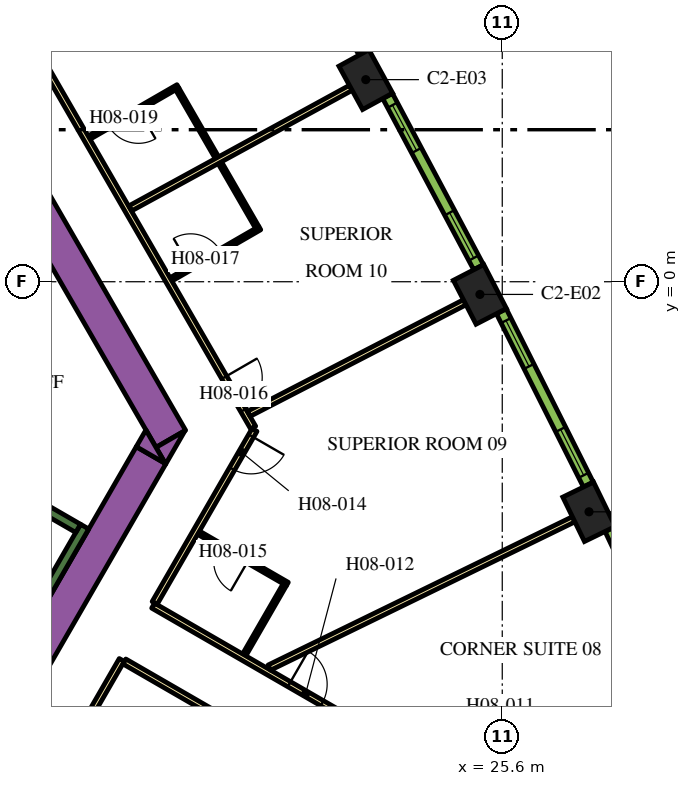
"""IFC4 building model, lengths in metres.
Left out: names, types, materials, properties, quantities, classifications, styles, units other than length and angle.
Written with IfcOpenShell. Run it as: python <this file> out.ifc"""

import sys

from ifc_helpers import new_model, si_unit, direction, frame, frame_2d, origin, origin_2d, place, context, subcontext, project, spatial, polyline, rectangle, outline, extrude, element, fill, save


model = new_model("IFC4")
c1 = context("Model", 3, precision=1e-05, world=origin(), true_north=direction((0.0, 1.0)))
c2 = subcontext(c1, "Body", "Model", "MODEL_VIEW")
j1 = project(units=[si_unit("LENGTHUNIT", "METRE"), si_unit("PLANEANGLEUNIT", "RADIAN")], contexts=[c1])
p1 = place(None, origin())
s1 = spatial("IfcSite", under=j1, at=p1, CompositionType="ELEMENT")
p2 = place(p1, origin())
s2 = spatial("IfcBuilding", under=s1, at=p2, CompositionType="ELEMENT")
p3 = place(p2, frame((0.0, 0.0, 107.1)))
s3 = spatial("IfcBuildingStorey", under=s2, at=p3, CompositionType="ELEMENT", Elevation=107.1)
for number, where, z_axis, x_axis in (
    (1, (27.883, -6.054, 0.0), (0.0, 0.0, 1.0), (-0.438, 0.899, 0.0)),
    (2, (25.012, -0.334, 0.0), (0.0, 0.0, 1.0), (-0.459, 0.888, 0.0)),
    (3, (22.009, 5.317, 0.0), (0.0, 0.0, 1.0), (-0.48, 0.877, 0.0)),
):
    element("IfcColumn", number, at=place(p3, frame(where, z_axis=z_axis, x_axis=x_axis)), inside=s3, PredefinedType="COLUMN", context=c2, shape_type="SweptSolid", body=[
        extrude(rectangle(XDim=1.3, YDim=0.9, at=origin_2d()), origin(), (0.0, 0.0, 1.0), 3.9),
    ])
p4 = place(p3, frame((6.711, 13.476, 0.0), z_axis=(0.0, 0.0, 1.0), x_axis=(0.500002723396, -0.866023831425, 0.0)))
e4 = element("IfcWall", 4, at=p4, inside=s3, PredefinedType="SOLIDWALL", context=c2, shape_type="SweptSolid", body=[
    extrude(rectangle(XDim=20.334, YDim=0.9, at=frame_2d((10.167, 0.0))), origin(), (0.0, 0.0, 1.0), 3.9),
])
p5 = place(p3, origin())
e5 = element("IfcWall", 5, at=p5, inside=s3, PredefinedType="SOLIDWALL", context=c2, shape_type="SweptSolid", body=[
    extrude(outline(polyline([(16.743, -4.8), (16.489, -4.36), (17.251, -3.92), (16.743, -4.8)])), origin(), (0.0, 0.0, 1.0), 3.9),
])
p6 = place(p3, frame((11.695, -12.644, 0.0), z_axis=(0.0, 0.0, 1.0), x_axis=(0.500010229568, 0.86601949766, 0.0)))
e6 = element("IfcWall", 6, at=p6, inside=s3, PredefinedType="SOLIDWALL", context=c2, shape_type="SweptSolid", body=[
    extrude(rectangle(XDim=9.326, YDim=0.9, at=frame_2d((4.663, 0.0))), origin(), (0.0, 0.0, 1.0), 3.9),
])
e7 = element("IfcWall", 7, at=p5, inside=s3, PredefinedType="SOLIDWALL", context=c2, shape_type="SweptSolid", body=[
    extrude(outline(polyline([(16.223, -3.9), (16.732, -4.78), (15.969, -4.34), (16.223, -3.9)])), origin(), (0.0, 0.0, 1.0), 3.9),
])
p7 = place(p3, frame((12.885, -9.431, 0.0), z_axis=(0.0, 0.0, 1.0), x_axis=(0.500020560727, 0.866013532718, 0.0)))
e8 = element("IfcWall", 8, at=p7, inside=s3, PredefinedType="SOLIDWALL", context=c2, shape_type="SweptSolid", body=[
    extrude(rectangle(XDim=3.45, YDim=0.25, at=frame_2d((1.725, 0.0))), origin(), (0.0, 0.0, 1.0), 3.9),
])
p8 = place(p3, frame((8.334, -2.964, 0.0), z_axis=(0.0, 0.0, 1.0), x_axis=(0.866016039709, -0.500016218704, 0.0)))
e9 = element("IfcWall", 9, at=p8, inside=s3, PredefinedType="SOLIDWALL", context=c2, shape_type="SweptSolid", body=[
    extrude(rectangle(XDim=7.05, YDim=0.25, at=frame_2d((3.525, 0.0))), origin(), (0.0, 0.0, 1.0), 3.9),
])
p9 = place(p3, frame((16.412, -8.523, 0.0), z_axis=(0.0, 0.0, 1.0), x_axis=(0.866025629663, -0.499999608766, 0.0)))
e10 = element("IfcWall", 10, at=p9, inside=s3, PredefinedType="PARTITIONING", context=c2, shape_type="SweptSolid", body=[
    extrude(rectangle(XDim=13.624, YDim=0.15, at=frame_2d((6.812, 0.0))), origin(), (0.0, 0.0, 1.0), 2.75),
])
p10 = place(p9, frame((4.134, 0.0, 0.0)))
e11 = element("IfcOpeningElement", 11, at=p10, cuts=e10, PredefinedType="OPENING", context=c2, shape_type="SweptSolid", body=[
    extrude(rectangle(XDim=1.0, YDim=2.1, at=frame_2d((0.5, 1.05))), frame((0.0, 0.085, 0.0), z_axis=(0.0, -1.0, 0.0), x_axis=(1.0, 0.0, 0.0)), (0.0, 0.0, 1.0), 0.17),
])
p11 = place(p3, frame((19.081, -3.9, 0.0), z_axis=(0.0, 0.0, 1.0), x_axis=(-0.499974327079, -0.866040225545, 0.0)))
e12 = element("IfcWall", 12, at=p11, inside=s3, PredefinedType="PARTITIONING", context=c2, shape_type="SweptSolid", body=[
    extrude(rectangle(XDim=5.258, YDim=0.15, at=frame_2d((2.629, 0.0))), origin(), (0.0, 0.0, 1.0), 2.75),
])
p12 = place(p11, frame((0.18, 0.0, 0.0)))
e13 = element("IfcOpeningElement", 13, at=p12, cuts=e12, PredefinedType="OPENING", context=c2, shape_type="SweptSolid", body=[
    extrude(rectangle(XDim=1.0, YDim=2.1, at=frame_2d((0.5, 1.05))), frame((0.0, 0.085, 0.0), z_axis=(0.0, -1.0, 0.0), x_axis=(1.0, 0.0, 0.0)), (0.0, 0.0, 1.0), 0.17),
])
p13 = place(p3, frame((6.163, 18.475, 0.0), z_axis=(0.0, 0.0, 1.0), x_axis=(0.500001317485, -0.866024643133, 0.0)))
e14 = element("IfcWall", 14, at=p13, inside=s3, PredefinedType="PARTITIONING", context=c2, shape_type="SweptSolid", body=[
    extrude(rectangle(XDim=25.767, YDim=0.15, at=frame_2d((12.883, 0.0))), origin(), (0.0, 0.0, 1.0), 2.75),
])
p14 = place(p13, frame((24.241, 0.0, 0.0)))
e15 = element("IfcOpeningElement", 15, at=p14, cuts=e14, PredefinedType="OPENING", context=c2, shape_type="SweptSolid", body=[
    extrude(rectangle(XDim=1.0, YDim=2.1, at=frame_2d((0.5, 1.05))), frame((0.0, 0.085, 0.0), z_axis=(0.0, -1.0, 0.0), x_axis=(1.0, 0.0, 0.0)), (0.0, 0.0, 1.0), 0.17),
])
p15 = place(p13, frame((13.144, 0.0, 0.0)))
e16 = element("IfcOpeningElement", 16, at=p15, cuts=e14, PredefinedType="OPENING", context=c2, shape_type="SweptSolid", body=[
    extrude(rectangle(XDim=1.0, YDim=2.1, at=frame_2d((0.5, 1.05))), frame((0.0, 0.085, 0.0), z_axis=(0.0, -1.0, 0.0), x_axis=(1.0, 0.0, 0.0)), (0.0, 0.0, 1.0), 0.17),
])
p16 = place(p13, frame((10.874, 0.0, 0.0)))
e17 = element("IfcOpeningElement", 17, at=p16, cuts=e14, PredefinedType="OPENING", context=c2, shape_type="SweptSolid", body=[
    extrude(rectangle(XDim=0.9, YDim=2.1, at=frame_2d((0.45, 1.05))), frame((0.0, 0.085, 0.0), z_axis=(0.0, -1.0, 0.0), x_axis=(1.0, 0.0, 0.0)), (0.0, 0.0, 1.0), 0.17),
])
p17 = place(p13, frame((3.718, 0.0, 0.0)))
e18 = element("IfcOpeningElement", 18, at=p17, cuts=e14, PredefinedType="OPENING", context=c2, shape_type="SweptSolid", body=[
    extrude(rectangle(XDim=1.0, YDim=2.1, at=frame_2d((0.5, 1.05))), frame((0.0, 0.085, 0.0), z_axis=(0.0, -1.0, 0.0), x_axis=(1.0, 0.0, 0.0)), (0.0, 0.0, 1.0), 0.17),
])
p18 = place(p13, frame((2.411, 0.0, 0.0)))
e19 = element("IfcOpeningElement", 19, at=p18, cuts=e14, PredefinedType="OPENING", context=c2, shape_type="SweptSolid", body=[
    extrude(rectangle(XDim=1.0, YDim=2.1, at=frame_2d((0.5, 1.05))), frame((0.0, 0.085, 0.0), z_axis=(0.0, -1.0, 0.0), x_axis=(1.0, 0.0, 0.0)), (0.0, 0.0, 1.0), 0.17),
])
p19 = place(p3, frame((15.587, -9.952, 0.0), z_axis=(0.0, 0.0, 1.0), x_axis=(-0.500016618951, -0.866015808616, 0.0)))
e20 = element("IfcWall", 20, at=p19, inside=s3, PredefinedType="PARTITIONING", context=c2, shape_type="SweptSolid", body=[
    extrude(rectangle(XDim=5.268, YDim=0.15, at=frame_2d((2.634, 0.0))), origin(), (0.0, 0.0, 1.0), 2.75),
])
p20 = place(p3, frame((27.386, -16.764, 0.0), z_axis=(0.0, 0.0, 1.0), x_axis=(-0.866022585856, 0.500004880763, 0.0)))
e21 = element("IfcWall", 21, at=p20, inside=s3, PredefinedType="PARTITIONING", context=c2, shape_type="SweptSolid", body=[
    extrude(rectangle(XDim=13.544, YDim=0.15, at=frame_2d((6.772, 0.0))), origin(), (0.0, 0.0, 1.0), 2.75),
])
p21 = place(p20, frame((9.447, 0.0, 0.0)))
e22 = element("IfcOpeningElement", 22, at=p21, cuts=e21, PredefinedType="OPENING", context=c2, shape_type="SweptSolid", body=[
    extrude(rectangle(XDim=1.0, YDim=2.1, at=frame_2d((0.5, 1.05))), frame((0.0, 0.085, 0.0), z_axis=(0.0, -1.0, 0.0), x_axis=(1.0, 0.0, 0.0)), (0.0, 0.0, 1.0), 0.17),
])
p22 = place(p20, frame((3.926, 0.0, 0.0)))
e23 = element("IfcOpeningElement", 23, at=p22, cuts=e21, PredefinedType="OPENING", context=c2, shape_type="SweptSolid", body=[
    extrude(rectangle(XDim=0.9, YDim=2.1, at=frame_2d((0.45, 1.05))), frame((0.0, 0.085, 0.0), z_axis=(0.0, -1.0, 0.0), x_axis=(1.0, 0.0, 0.0)), (0.0, 0.0, 1.0), 0.17),
])
p23 = place(p3, frame((21.614, 5.102, 0.0), z_axis=(0.0, 0.0, 1.0), x_axis=(-0.877484555087, -0.479604895287, 0.0)))
e24 = element("IfcWall", 24, at=p23, inside=s3, PredefinedType="PARTITIONING", context=c2, shape_type="SweptSolid", body=[
    extrude(rectangle(XDim=6.611, YDim=0.15, at=frame_2d((3.306, 0.0))), origin(), (0.0, 0.0, 1.0), 2.75),
])
p24 = place(p3, frame((24.613, -0.541, 0.0), z_axis=(0.0, 0.0, 1.0), x_axis=(-0.888459912519, -0.458954228487, 0.0)))
e25 = element("IfcWall", 25, at=p24, inside=s3, PredefinedType="PARTITIONING", context=c2, shape_type="SweptSolid", body=[
    extrude(rectangle(XDim=6.392, YDim=0.15, at=frame_2d((3.196, 0.0))), origin(), (0.0, 0.0, 1.0), 2.75),
])
p25 = place(p3, frame((27.478, -6.251, 0.0), z_axis=(0.0, 0.0, 1.0), x_axis=(-0.898940618603, -0.438070501432, 0.0)))
e26 = element("IfcWall", 26, at=p25, inside=s3, PredefinedType="PARTITIONING", context=c2, shape_type="SweptSolid", body=[
    extrude(rectangle(XDim=8.909, YDim=0.15, at=frame_2d((4.455, 0.0))), origin(), (0.0, 0.0, 1.0), 2.75),
])
p26 = place(p3, frame((19.946, -7.953, 0.0), z_axis=(0.0, 0.0, 1.0), x_axis=(-0.86599734893, 0.500048589285, 0.0)))
e27 = element("IfcWall", 27, at=p26, inside=s3, PredefinedType="PARTITIONING", context=c2, shape_type="SweptSolid", body=[
    extrude(rectangle(XDim=2.7, YDim=0.1, at=frame_2d((1.35, 0.0))), origin(), (0.0, 0.0, 1.0), 2.75),
])
p27 = place(p26, frame((1.2, 0.0, 0.0)))
e28 = element("IfcOpeningElement", 28, at=p27, cuts=e27, PredefinedType="OPENING", context=c2, shape_type="SweptSolid", body=[
    extrude(rectangle(XDim=0.9, YDim=2.1, at=frame_2d((0.45, 1.05))), frame((0.0, 0.06, 0.0), z_axis=(0.0, -1.0, 0.0), x_axis=(1.0, 0.0, 0.0)), (0.0, 0.0, 1.0), 0.12),
])
p28 = place(p3, frame((19.877, -7.972, 0.0), z_axis=(0.0, 0.0, 1.0), x_axis=(-0.500010206181, -0.866019511163, 0.0)))
e29 = element("IfcWall", 29, at=p28, inside=s3, PredefinedType="PARTITIONING", context=c2, shape_type="SweptSolid", body=[
    extrude(rectangle(XDim=2.13, YDim=0.1, at=frame_2d((1.065, 0.0))), origin(), (0.0, 0.0, 1.0), 2.75),
])
p29 = place(p3, frame((16.881, 0.061, 0.0), z_axis=(0.0, 0.0, 1.0), x_axis=(0.866019956843, 0.50000943426, 0.0)))
e30 = element("IfcWall", 30, at=p29, inside=s3, PredefinedType="PARTITIONING", context=c2, shape_type="SweptSolid", body=[
    extrude(rectangle(XDim=2.7, YDim=0.1, at=frame_2d((1.35, 0.0))), origin(), (0.0, 0.0, 1.0), 2.75),
])
p30 = place(p29, frame((0.6, 0.0, 0.0)))
e31 = element("IfcOpeningElement", 31, at=p30, cuts=e30, PredefinedType="OPENING", context=c2, shape_type="SweptSolid", body=[
    extrude(rectangle(XDim=0.9, YDim=2.1, at=frame_2d((0.45, 1.05))), frame((0.0, 0.06, 0.0), z_axis=(0.0, -1.0, 0.0), x_axis=(1.0, 0.0, 0.0)), (0.0, 0.0, 1.0), 0.12),
])
p31 = place(p3, frame((19.151, 1.429, 0.0), z_axis=(0.0, 0.0, 1.0), x_axis=(-0.500024377727, 0.866011328839, 0.0)))
e32 = element("IfcWall", 32, at=p31, inside=s3, PredefinedType="PARTITIONING", context=c2, shape_type="SweptSolid", body=[
    extrude(rectangle(XDim=1.96, YDim=0.1, at=frame_2d((0.98, 0.0))), origin(), (0.0, 0.0, 1.0), 2.75),
])
p32 = place(p3, frame((17.066, 5.141, 0.0), z_axis=(0.0, 0.0, 1.0), x_axis=(-0.866059108428, -0.4999416173, 0.0)))
e33 = element("IfcWall", 33, at=p32, inside=s3, PredefinedType="PARTITIONING", context=c2, shape_type="SweptSolid", body=[
    extrude(rectangle(XDim=2.7, YDim=0.1, at=frame_2d((1.35, 0.0))), origin(), (0.0, 0.0, 1.0), 2.75),
])
p33 = place(p32, frame((1.2, 0.0, 0.0)))
e34 = element("IfcOpeningElement", 34, at=p33, cuts=e33, PredefinedType="OPENING", context=c2, shape_type="SweptSolid", body=[
    extrude(rectangle(XDim=0.9, YDim=2.1, at=frame_2d((0.45, 1.05))), frame((0.0, 0.06, 0.0), z_axis=(0.0, -1.0, 0.0), x_axis=(1.0, 0.0, 0.0)), (0.0, 0.0, 1.0), 0.12),
])
p34 = place(p3, frame((17.047, 5.073, 0.0), z_axis=(0.0, 0.0, 1.0), x_axis=(0.500008976872, -0.866020220923, 0.0)))
e35 = element("IfcWall", 35, at=p34, inside=s3, PredefinedType="PARTITIONING", context=c2, shape_type="SweptSolid", body=[
    extrude(rectangle(XDim=2.09, YDim=0.1, at=frame_2d((1.045, 0.0))), origin(), (0.0, 0.0, 1.0), 2.75),
])
p35 = place(p3, frame((30.62, -11.127, 0.0), z_axis=(0.0, 0.0, 1.0), x_axis=(-0.427543726596, 0.903994669148, 0.0)))
e36 = element("IfcWall", 36, at=p35, inside=s3, PredefinedType="SOLIDWALL", context=c2, shape_type="SweptSolid", body=[
    extrude(rectangle(XDim=5.107, YDim=0.29, at=frame_2d((2.553, 0.0))), origin(), (0.0, 0.0, 1.0), 3.65),
])
p36 = place(p35, frame((0.24, 0.0, 0.9)))
e37 = element("IfcOpeningElement", 37, at=p36, cuts=e36, PredefinedType="OPENING", context=c2, shape_type="SweptSolid", body=[
    extrude(rectangle(XDim=1.35, YDim=2.15, at=frame_2d((0.675, 1.075))), frame((0.0, 0.155, 0.0), z_axis=(0.0, -1.0, 0.0), x_axis=(1.0, 0.0, 0.0)), (0.0, 0.0, 1.0), 0.31),
])
p37 = place(p35, frame((3.471, 0.0, 0.9)))
e38 = element("IfcOpeningElement", 38, at=p37, cuts=e36, PredefinedType="OPENING", context=c2, shape_type="SweptSolid", body=[
    extrude(rectangle(XDim=1.35, YDim=2.15, at=frame_2d((0.675, 1.075))), frame((0.0, 0.155, 0.0), z_axis=(0.0, -1.0, 0.0), x_axis=(1.0, 0.0, 0.0)), (0.0, 0.0, 1.0), 0.31),
])
p38 = place(p3, frame((27.864, -5.336, 0.0), z_axis=(0.0, 0.0, 1.0), x_axis=(-0.448534297211, 0.893765620409, 0.0)))
e39 = element("IfcWall", 39, at=p38, inside=s3, PredefinedType="SOLIDWALL", context=c2, shape_type="SweptSolid", body=[
    extrude(rectangle(XDim=5.1, YDim=0.29, at=frame_2d((2.55, 0.0))), origin(), (0.0, 0.0, 1.0), 3.65),
])
p39 = place(p38, frame((0.272, 0.0, 0.9)))
e40 = element("IfcOpeningElement", 40, at=p39, cuts=e39, PredefinedType="OPENING", context=c2, shape_type="SweptSolid", body=[
    extrude(rectangle(XDim=1.35, YDim=2.15, at=frame_2d((0.675, 1.075))), frame((0.0, 0.155, 0.0), z_axis=(0.0, -1.0, 0.0), x_axis=(1.0, 0.0, 0.0)), (0.0, 0.0, 1.0), 0.31),
])
p40 = place(p38, frame((3.478, 0.0, 0.9)))
e41 = element("IfcOpeningElement", 41, at=p40, cuts=e39, PredefinedType="OPENING", context=c2, shape_type="SweptSolid", body=[
    extrude(rectangle(XDim=1.35, YDim=2.15, at=frame_2d((0.675, 1.075))), frame((0.0, 0.155, 0.0), z_axis=(0.0, -1.0, 0.0), x_axis=(1.0, 0.0, 0.0)), (0.0, 0.0, 1.0), 0.31),
])
p41 = place(p3, frame((24.977, 0.383, 0.0), z_axis=(0.0, 0.0, 1.0), x_axis=(-0.469323203119, 0.883026461106, 0.0)))
e42 = element("IfcWall", 42, at=p41, inside=s3, PredefinedType="SOLIDWALL", context=c2, shape_type="SweptSolid", body=[
    extrude(rectangle(XDim=5.101, YDim=0.29, at=frame_2d((2.55, 0.0))), origin(), (0.0, 0.0, 1.0), 3.65),
])
p42 = place(p41, frame((0.273, 0.0, 0.9)))
e43 = element("IfcOpeningElement", 43, at=p42, cuts=e42, PredefinedType="OPENING", context=c2, shape_type="SweptSolid", body=[
    extrude(rectangle(XDim=1.35, YDim=2.15, at=frame_2d((0.675, 1.075))), frame((0.0, 0.155, 0.0), z_axis=(0.0, -1.0, 0.0), x_axis=(1.0, 0.0, 0.0)), (0.0, 0.0, 1.0), 0.31),
])
p43 = place(p41, frame((3.478, 0.0, 0.9)))
e44 = element("IfcOpeningElement", 44, at=p43, cuts=e42, PredefinedType="OPENING", context=c2, shape_type="SweptSolid", body=[
    extrude(rectangle(XDim=1.35, YDim=2.15, at=frame_2d((0.675, 1.075))), frame((0.0, 0.155, 0.0), z_axis=(0.0, -1.0, 0.0), x_axis=(1.0, 0.0, 0.0)), (0.0, 0.0, 1.0), 0.31),
])
p44 = place(p3, frame((21.956, 6.033, 0.0), z_axis=(0.0, 0.0, 1.0), x_axis=(-0.48983164787, 0.87181704316, 0.0)))
e45 = element("IfcWall", 45, at=p44, inside=s3, PredefinedType="SOLIDWALL", context=c2, shape_type="SweptSolid", body=[
    extrude(rectangle(XDim=5.1, YDim=0.29, at=frame_2d((2.55, 0.0))), origin(), (0.0, 0.0, 1.0), 3.65),
])
p45 = place(p44, frame((0.273, 0.0, 0.9)))
e46 = element("IfcOpeningElement", 46, at=p45, cuts=e45, PredefinedType="OPENING", context=c2, shape_type="SweptSolid", body=[
    extrude(rectangle(XDim=1.35, YDim=2.15, at=frame_2d((0.675, 1.075))), frame((0.0, 0.155, 0.0), z_axis=(0.0, -1.0, 0.0), x_axis=(1.0, 0.0, 0.0)), (0.0, 0.0, 1.0), 0.31),
])
p46 = place(p44, frame((3.478, 0.0, 0.9)))
e47 = element("IfcOpeningElement", 47, at=p46, cuts=e45, PredefinedType="OPENING", context=c2, shape_type="SweptSolid", body=[
    extrude(rectangle(XDim=1.35, YDim=2.15, at=frame_2d((0.675, 1.075))), frame((0.0, 0.155, 0.0), z_axis=(0.0, -1.0, 0.0), x_axis=(1.0, 0.0, 0.0)), (0.0, 0.0, 1.0), 0.31),
])
p47 = place(p10, origin())
e48 = element("IfcDoor", 48, at=p47, inside=s3, OperationType="SINGLE_SWING_LEFT", PredefinedType="DOOR", context=c2, shape_type="SweptSolid", body=[
    extrude(rectangle(XDim=1.0, YDim=2.1, at=frame_2d((0.5, 1.05))), frame((0.0, 0.025, 0.0), z_axis=(0.0, -1.0, 0.0), x_axis=(1.0, 0.0, 0.0)), (0.0, 0.0, 1.0), 0.05),
])
fill(e11, e48)
p48 = place(p12, origin())
e49 = element("IfcDoor", 49, at=p48, inside=s3, OperationType="SINGLE_SWING_LEFT", PredefinedType="DOOR", context=c2, shape_type="SweptSolid", body=[
    extrude(rectangle(XDim=1.0, YDim=2.1, at=frame_2d((0.5, 1.05))), frame((0.0, 0.025, 0.0), z_axis=(0.0, -1.0, 0.0), x_axis=(1.0, 0.0, 0.0)), (0.0, 0.0, 1.0), 0.05),
])
fill(e13, e49)
p49 = place(p27, origin())
e50 = element("IfcDoor", 50, at=p49, inside=s3, OperationType="SINGLE_SWING_RIGHT", PredefinedType="DOOR", context=c2, shape_type="SweptSolid", body=[
    extrude(rectangle(XDim=0.9, YDim=2.1, at=frame_2d((0.45, 1.05))), frame((0.0, 0.025, 0.0), z_axis=(0.0, -1.0, 0.0), x_axis=(1.0, 0.0, 0.0)), (0.0, 0.0, 1.0), 0.05),
])
fill(e28, e50)
p50 = place(p14, origin())
e51 = element("IfcDoor", 51, at=p50, inside=s3, OperationType="SINGLE_SWING_RIGHT", PredefinedType="DOOR", context=c2, shape_type="SweptSolid", body=[
    extrude(rectangle(XDim=1.0, YDim=2.1, at=frame_2d((0.5, 1.05))), frame((0.0, 0.025, 0.0), z_axis=(0.0, -1.0, 0.0), x_axis=(1.0, 0.0, 0.0)), (0.0, 0.0, 1.0), 0.05),
])
fill(e15, e51)
p51 = place(p30, origin())
e52 = element("IfcDoor", 52, at=p51, inside=s3, OperationType="SINGLE_SWING_LEFT", PredefinedType="DOOR", context=c2, shape_type="SweptSolid", body=[
    extrude(rectangle(XDim=0.9, YDim=2.1, at=frame_2d((0.45, 1.05))), frame((0.0, 0.025, 0.0), z_axis=(0.0, -1.0, 0.0), x_axis=(1.0, 0.0, 0.0)), (0.0, 0.0, 1.0), 0.05),
])
fill(e31, e52)
p52 = place(p33, origin())
e53 = element("IfcDoor", 53, at=p52, inside=s3, OperationType="SINGLE_SWING_LEFT", PredefinedType="DOOR", context=c2, shape_type="SweptSolid", body=[
    extrude(rectangle(XDim=0.9, YDim=2.1, at=frame_2d((0.45, 1.05))), frame((0.0, 0.025, 0.0), z_axis=(0.0, -1.0, 0.0), x_axis=(1.0, 0.0, 0.0)), (0.0, 0.0, 1.0), 0.05),
])
fill(e34, e53)
p53 = place(p39, origin())
e54 = element("IfcWindow", 54, at=p53, inside=s3, PartitioningType="DOUBLE_PANEL_VERTICAL", PredefinedType="WINDOW", context=c2, shape_type="SweptSolid", body=[
    extrude(rectangle(XDim=1.35, YDim=2.15, at=frame_2d((0.675, 1.075))), frame((0.0, 0.015, 0.0), z_axis=(0.0, -1.0, 0.0), x_axis=(1.0, 0.0, 0.0)), (0.0, 0.0, 1.0), 0.06),
])
fill(e40, e54)
p54 = place(p40, origin())
e55 = element("IfcWindow", 55, at=p54, inside=s3, PartitioningType="DOUBLE_PANEL_VERTICAL", PredefinedType="WINDOW", context=c2, shape_type="SweptSolid", body=[
    extrude(rectangle(XDim=1.35, YDim=2.15, at=frame_2d((0.675, 1.075))), frame((0.0, 0.015, 0.0), z_axis=(0.0, -1.0, 0.0), x_axis=(1.0, 0.0, 0.0)), (0.0, 0.0, 1.0), 0.06),
])
fill(e41, e55)
p55 = place(p42, origin())
e56 = element("IfcWindow", 56, at=p55, inside=s3, PartitioningType="DOUBLE_PANEL_VERTICAL", PredefinedType="WINDOW", context=c2, shape_type="SweptSolid", body=[
    extrude(rectangle(XDim=1.35, YDim=2.15, at=frame_2d((0.675, 1.075))), frame((0.0, 0.015, 0.0), z_axis=(0.0, -1.0, 0.0), x_axis=(1.0, 0.0, 0.0)), (0.0, 0.0, 1.0), 0.06),
])
fill(e43, e56)
p56 = place(p43, origin())
e57 = element("IfcWindow", 57, at=p56, inside=s3, PartitioningType="DOUBLE_PANEL_VERTICAL", PredefinedType="WINDOW", context=c2, shape_type="SweptSolid", body=[
    extrude(rectangle(XDim=1.35, YDim=2.15, at=frame_2d((0.675, 1.075))), frame((0.0, 0.015, 0.0), z_axis=(0.0, -1.0, 0.0), x_axis=(1.0, 0.0, 0.0)), (0.0, 0.0, 1.0), 0.06),
])
fill(e44, e57)
save(model, sys.argv[1])
